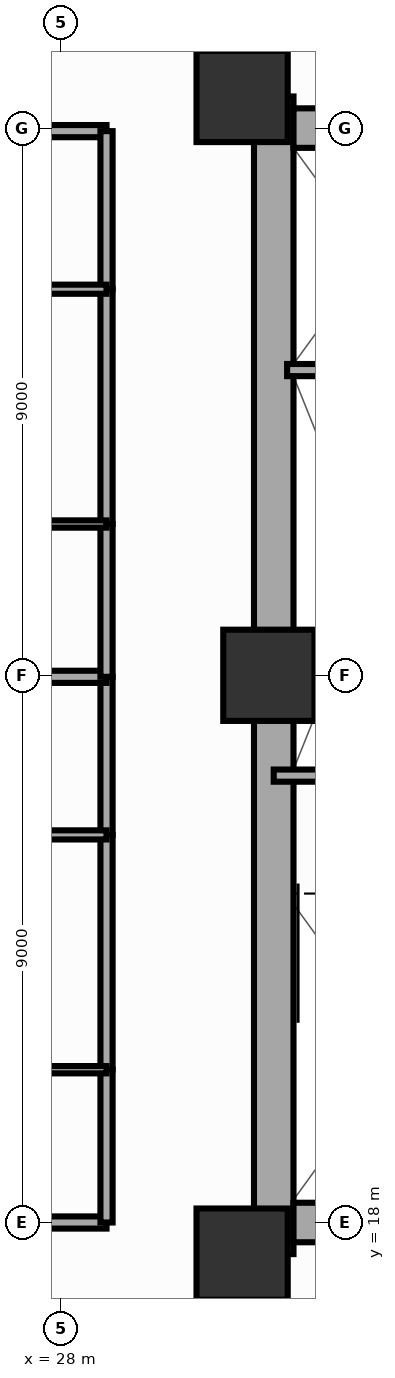
"""IFC4 building model, lengths in metres.
Left out: names, types, materials, properties, quantities, classifications, styles, units other than length and angle.
Written with IfcOpenShell. Run it as: python <this file> out.ifc"""

import sys

from ifc_helpers import new_model, si_unit, direction, frame, frame_2d, origin, origin_2d, place, context, subcontext, project, spatial, rectangle, extrude, source, transform, mapped, element, fill, save


model = new_model("IFC4")
c1 = context("Model", 3, precision=1e-05, world=origin(), true_north=direction((0.0, 1.0)))
c2 = subcontext(c1, "Body", "Model", "MODEL_VIEW")
j1 = project(units=[si_unit("LENGTHUNIT", "METRE"), si_unit("PLANEANGLEUNIT", "RADIAN")], contexts=[c1])
p1 = place(None, origin())
s1 = spatial("IfcSite", under=j1, at=p1, CompositionType="ELEMENT")
p2 = place(p1, origin())
s2 = spatial("IfcBuilding", under=s1, at=p2, CompositionType="ELEMENT")
p3 = place(p2, frame((0.0, 0.0, 19.4)))
s3 = spatial("IfcBuildingStorey", under=s2, at=p3, CompositionType="ELEMENT", Elevation=19.4)
p4 = place(p3, frame((31.5, 17.48, 0.0), z_axis=(0.0, 0.0, 1.0), x_axis=(0.0, 1.0, 0.0)))
e1 = element("IfcWall", 1, at=p4, inside=s3, PredefinedType="SHEAR", context=c2, shape_type="SweptSolid", body=[
    extrude(rectangle(XDim=19.04, YDim=0.65, at=frame_2d((9.52, 0.0))), origin(), (0.0, 0.0, 1.0), 3.0),
])
p5 = place(p4, frame((6.32, 0.0, 0.0)))
e2 = element("IfcOpeningElement", 2, at=p5, cuts=e1, PredefinedType="OPENING", context=c2, shape_type="SweptSolid", body=[
    extrude(rectangle(XDim=1.1, YDim=2.15, at=frame_2d((0.55, 1.075))), frame((0.0, 0.337, 0.0), z_axis=(0.0, -1.0, 0.0), x_axis=(1.0, 0.0, 0.0)), (0.0, 0.0, 1.0), 0.674),
])
p6 = place(p3, frame((31.825, 18.0, 0.0), z_axis=(0.0, 0.0, 1.0), x_axis=(1.0, 0.0, 0.0)))
e3 = element("IfcWall", 3, at=p6, inside=s3, PredefinedType="SHEAR", context=c2, shape_type="SweptSolid", body=[
    extrude(rectangle(XDim=12.35, YDim=0.65, at=frame_2d((6.175, 0.0))), origin(), (0.0, 0.0, 1.0), 3.0),
])
p7 = place(p3, frame((31.825, 36.0, 0.0), z_axis=(0.0, 0.0, 1.0), x_axis=(1.0, 0.0, 0.0)))
e4 = element("IfcWall", 4, at=p7, inside=s3, PredefinedType="SHEAR", context=c2, shape_type="SweptSolid", body=[
    extrude(rectangle(XDim=12.35, YDim=0.65, at=frame_2d((6.175, 0.0))), origin(), (0.0, 0.0, 1.0), 3.0),
])
p8 = place(p7, frame((5.125, 0.0, 0.0), z_axis=(0.0, 0.0, 1.0), x_axis=(-1.0, 0.0, 0.0)))
e5 = element("IfcOpeningElement", 5, at=p8, cuts=e4, PredefinedType="OPENING", context=c2, shape_type="SweptSolid", body=[
    extrude(rectangle(XDim=1.4, YDim=2.15, at=frame_2d((0.7, 1.075))), frame((0.0, 0.337, 0.0), z_axis=(0.0, -1.0, 0.0), x_axis=(1.0, 0.0, 0.0)), (0.0, 0.0, 1.0), 0.674),
])
m1 = source(origin(), c2, "Body", "SweptSolid", [
    extrude(rectangle(XDim=1.5, YDim=1.5, at=origin_2d()), origin(), (0.0, 0.0, 1.0), 3.0),
])
for number, where, z_axis, x_axis in (
    (6, (30.98, 17.48, 0.0), (0.0, 0.0, 1.0), (1.0, 0.0, 0.0)),
    (7, (30.98, 36.52, 0.0), (0.0, 0.0, 1.0), (1.0, 0.0, 0.0)),
    (8, (31.42, 27.0, 0.0), (0.0, 0.0, 1.0), (1.0, 0.0, 0.0)),
):
    element("IfcColumn", number, at=place(p3, frame(where, z_axis=z_axis, x_axis=x_axis)), inside=s3, PredefinedType="COLUMN", context=c2, shape_type="MappedRepresentation", body=[
        mapped(m1, transform((0.0, 0.0, 0.0), scale=1.0)),
    ])
p9 = place(p3, frame((31.5, 25.35, 0.0), z_axis=(0.0, 0.0, 1.0), x_axis=(1.0, 0.0, 0.0)))
e9 = element("IfcWall", 9, at=p9, inside=s3, PredefinedType="SOLIDWALL", context=c2, shape_type="SweptSolid", body=[
    extrude(rectangle(XDim=3.93, YDim=0.2, at=frame_2d((1.965, 0.0))), origin(), (0.0, 0.0, 1.0), 2.79),
])
p10 = place(p3, frame((31.72, 32.02, 0.0), z_axis=(0.0, 0.0, 1.0), x_axis=(1.0, 0.0, 0.0)))
e10 = element("IfcWall", 10, at=p10, inside=s3, PredefinedType="PARTITIONING", context=c2, shape_type="SweptSolid", body=[
    extrude(rectangle(XDim=2.8, YDim=0.2, at=frame_2d((1.4, 0.0))), origin(), (0.0, 0.0, 1.0), 2.79),
])
for number, where, z_axis, x_axis in (
    (11, (28.75, 18.0, 0.0), (0.0, 0.0, 1.0), (-1.0, 0.0, 0.0)),
    (12, (28.75, 35.95, 0.0), (0.0, 0.0, 1.0), (-1.0, 0.0, 0.0)),
):
    element("IfcWall", number, at=place(p3, frame(where, z_axis=z_axis, x_axis=x_axis)), inside=s3, PredefinedType="PARTITIONING", context=c2, shape_type="SweptSolid", body=[
        extrude(rectangle(XDim=16.6, YDim=0.2, at=frame_2d((8.3, 0.0))), origin(), (0.0, 0.0, 1.0), 2.24),
    ])
p11 = place(p3, frame((28.75, 18.0, 0.0), z_axis=(0.0, 0.0, 1.0), x_axis=(0.0, 1.0, 0.0)))
e13 = element("IfcWall", 13, at=p11, inside=s3, PredefinedType="PARTITIONING", context=c2, shape_type="SweptSolid", body=[
    extrude(rectangle(XDim=2.513, YDim=0.2, at=frame_2d((1.256, 0.0))), origin(), (0.0, 0.0, 1.0), 2.79),
])
p12 = place(p3, frame((28.75, 20.513, 0.0), z_axis=(0.0, 0.0, 1.0), x_axis=(0.0, 1.0, 0.0)))
e14 = element("IfcWall", 14, at=p12, inside=s3, PredefinedType="PARTITIONING", context=c2, shape_type="SweptSolid", body=[
    extrude(rectangle(XDim=3.862, YDim=0.2, at=frame_2d((1.931, 0.0))), origin(), (0.0, 0.0, 1.0), 2.79),
])
p13 = place(p12, frame((1.431, 0.0, 0.0)))
e15 = element("IfcOpeningElement", 15, at=p13, cuts=e14, PredefinedType="OPENING", context=c2, shape_type="SweptSolid", body=[
    extrude(rectangle(XDim=1.0, YDim=2.15, at=frame_2d((0.5, 1.075))), frame((0.0, 0.112, 0.0), z_axis=(0.0, -1.0, 0.0), x_axis=(1.0, 0.0, 0.0)), (0.0, 0.0, 1.0), 0.224),
])
p14 = place(p3, frame((28.75, 24.375, 0.0), z_axis=(0.0, 0.0, 1.0), x_axis=(0.0, 1.0, 0.0)))
e16 = element("IfcWall", 16, at=p14, inside=s3, PredefinedType="PARTITIONING", context=c2, shape_type="SweptSolid", body=[
    extrude(rectangle(XDim=2.6, YDim=0.2, at=frame_2d((1.3, 0.0))), origin(), (0.0, 0.0, 1.0), 2.79),
])
p15 = place(p3, frame((28.75, 20.513, 0.0), z_axis=(0.0, 0.0, 1.0), x_axis=(-1.0, 0.0, 0.0)))
e17 = element("IfcWall", 17, at=p15, inside=s3, PredefinedType="PARTITIONING", context=c2, shape_type="SweptSolid", body=[
    extrude(rectangle(XDim=2.12, YDim=0.12, at=frame_2d((1.06, 0.0))), origin(), (0.0, 0.0, 1.0), 2.79),
])
p16 = place(p15, frame((0.635, 0.0, 0.0)))
e18 = element("IfcOpeningElement", 18, at=p16, cuts=e17, PredefinedType="OPENING", context=c2, shape_type="SweptSolid", body=[
    extrude(rectangle(XDim=0.85, YDim=2.05, at=frame_2d((0.425, 1.025))), frame((0.0, 0.072, 0.0), z_axis=(0.0, -1.0, 0.0), x_axis=(1.0, 0.0, 0.0)), (0.0, 0.0, 1.0), 0.144),
])
p17 = place(p3, frame((28.75, 24.375, 0.0), z_axis=(0.0, 0.0, 1.0), x_axis=(-1.0, 0.0, 0.0)))
e19 = element("IfcWall", 19, at=p17, inside=s3, PredefinedType="PARTITIONING", context=c2, shape_type="SweptSolid", body=[
    extrude(rectangle(XDim=2.59, YDim=0.15, at=frame_2d((1.295, 0.0))), origin(), (0.0, 0.0, 1.0), 2.79),
])
p18 = place(p17, frame((0.845, 0.0, 0.0)))
e20 = element("IfcOpeningElement", 20, at=p18, cuts=e19, PredefinedType="OPENING", context=c2, shape_type="SweptSolid", body=[
    extrude(rectangle(XDim=0.9, YDim=2.1, at=frame_2d((0.45, 1.05))), frame((0.0, 0.087, 0.0), z_axis=(0.0, -1.0, 0.0), x_axis=(1.0, 0.0, 0.0)), (0.0, 0.0, 1.0), 0.174),
])
p19 = place(p3, frame((28.75, 26.975, 0.0), z_axis=(0.0, 0.0, 1.0), x_axis=(-1.0, 0.0, 0.0)))
e21 = element("IfcWall", 21, at=p19, inside=s3, PredefinedType="PARTITIONING", context=c2, shape_type="SweptSolid", body=[
    extrude(rectangle(XDim=16.6, YDim=0.2, at=frame_2d((8.3, 0.0))), origin(), (0.0, 0.0, 1.0), 2.79),
])
p20 = place(p3, frame((28.75, 26.975, 0.0), z_axis=(0.0, 0.0, 1.0), x_axis=(0.0, 1.0, 0.0)))
e22 = element("IfcWall", 22, at=p20, inside=s3, PredefinedType="PARTITIONING", context=c2, shape_type="SweptSolid", body=[
    extrude(rectangle(XDim=2.513, YDim=0.2, at=frame_2d((1.256, 0.0))), origin(), (0.0, 0.0, 1.0), 2.79),
])
p21 = place(p3, frame((28.75, 29.488, 0.0), z_axis=(0.0, 0.0, 1.0), x_axis=(0.0, 1.0, 0.0)))
e23 = element("IfcWall", 23, at=p21, inside=s3, PredefinedType="PARTITIONING", context=c2, shape_type="SweptSolid", body=[
    extrude(rectangle(XDim=3.862, YDim=0.2, at=frame_2d((1.931, 0.0))), origin(), (0.0, 0.0, 1.0), 2.79),
])
p22 = place(p21, frame((1.431, 0.0, 0.0)))
e24 = element("IfcOpeningElement", 24, at=p22, cuts=e23, PredefinedType="OPENING", context=c2, shape_type="SweptSolid", body=[
    extrude(rectangle(XDim=1.0, YDim=2.15, at=frame_2d((0.5, 1.075))), frame((0.0, 0.112, 0.0), z_axis=(0.0, -1.0, 0.0), x_axis=(1.0, 0.0, 0.0)), (0.0, 0.0, 1.0), 0.224),
])
p23 = place(p3, frame((28.75, 33.35, 0.0), z_axis=(0.0, 0.0, 1.0), x_axis=(0.0, 1.0, 0.0)))
e25 = element("IfcWall", 25, at=p23, inside=s3, PredefinedType="PARTITIONING", context=c2, shape_type="SweptSolid", body=[
    extrude(rectangle(XDim=2.6, YDim=0.2, at=frame_2d((1.3, 0.0))), origin(), (0.0, 0.0, 1.0), 2.79),
])
p24 = place(p3, frame((28.75, 29.488, 0.0), z_axis=(0.0, 0.0, 1.0), x_axis=(-1.0, 0.0, 0.0)))
e26 = element("IfcWall", 26, at=p24, inside=s3, PredefinedType="PARTITIONING", context=c2, shape_type="SweptSolid", body=[
    extrude(rectangle(XDim=2.12, YDim=0.12, at=frame_2d((1.06, 0.0))), origin(), (0.0, 0.0, 1.0), 2.79),
])
p25 = place(p24, frame((0.635, 0.0, 0.0)))
e27 = element("IfcOpeningElement", 27, at=p25, cuts=e26, PredefinedType="OPENING", context=c2, shape_type="SweptSolid", body=[
    extrude(rectangle(XDim=0.85, YDim=2.05, at=frame_2d((0.425, 1.025))), frame((0.0, 0.072, 0.0), z_axis=(0.0, -1.0, 0.0), x_axis=(1.0, 0.0, 0.0)), (0.0, 0.0, 1.0), 0.144),
])
p26 = place(p3, frame((28.75, 33.35, 0.0), z_axis=(0.0, 0.0, 1.0), x_axis=(-1.0, 0.0, 0.0)))
e28 = element("IfcWall", 28, at=p26, inside=s3, PredefinedType="PARTITIONING", context=c2, shape_type="SweptSolid", body=[
    extrude(rectangle(XDim=2.59, YDim=0.15, at=frame_2d((1.295, 0.0))), origin(), (0.0, 0.0, 1.0), 2.79),
])
p27 = place(p26, frame((0.845, 0.0, 0.0)))
e29 = element("IfcOpeningElement", 29, at=p27, cuts=e28, PredefinedType="OPENING", context=c2, shape_type="SweptSolid", body=[
    extrude(rectangle(XDim=0.9, YDim=2.1, at=frame_2d((0.45, 1.05))), frame((0.0, 0.087, 0.0), z_axis=(0.0, -1.0, 0.0), x_axis=(1.0, 0.0, 0.0)), (0.0, 0.0, 1.0), 0.174),
])
m2 = source(origin(), c2, "Body", "SweptSolid", [
    extrude(rectangle(XDim=1.1, YDim=2.15, at=frame_2d((0.55, 1.075))), frame((0.0, 0.025, 0.0), z_axis=(0.0, -1.0, 0.0), x_axis=(1.0, 0.0, 0.0)), (0.0, 0.0, 1.0), 0.05),
])
p28 = place(p5, origin())
e30 = element("IfcDoor", 30, at=p28, inside=s3, OperationType="SINGLE_SWING_LEFT", PredefinedType="DOOR", context=c2, shape_type="MappedRepresentation", body=[
    mapped(m2, transform((0.0, 0.0, 0.0), scale=1.0)),
])
fill(e2, e30)
m3 = source(origin(), c2, "Body", "SweptSolid", [
    extrude(rectangle(XDim=1.0, YDim=2.15, at=frame_2d((0.5, 1.075))), frame((0.0, 0.025, 0.0), z_axis=(0.0, -1.0, 0.0), x_axis=(1.0, 0.0, 0.0)), (0.0, 0.0, 1.0), 0.05),
])
p29 = place(p13, origin())
e31 = element("IfcDoor", 31, at=p29, inside=s3, OperationType="SINGLE_SWING_RIGHT", PredefinedType="DOOR", context=c2, shape_type="MappedRepresentation", body=[
    mapped(m3, transform((0.0, 0.0, 0.0), scale=1.0)),
])
fill(e15, e31)
m4 = source(origin(), c2, "Body", "SweptSolid", [
    extrude(rectangle(XDim=0.85, YDim=2.05, at=frame_2d((0.425, 1.025))), frame((0.0, 0.025, 0.0), z_axis=(0.0, -1.0, 0.0), x_axis=(1.0, 0.0, 0.0)), (0.0, 0.0, 1.0), 0.05),
])
p30 = place(p16, origin())
e32 = element("IfcDoor", 32, at=p30, inside=s3, OperationType="SINGLE_SWING_LEFT", PredefinedType="DOOR", context=c2, shape_type="MappedRepresentation", body=[
    mapped(m4, transform((0.0, 0.0, 0.0), scale=1.0)),
])
fill(e18, e32)
m5 = source(origin(), c2, "Body", "SweptSolid", [
    extrude(rectangle(XDim=0.9, YDim=2.1, at=frame_2d((0.45, 1.05))), frame((0.0, 0.025, 0.0), z_axis=(0.0, -1.0, 0.0), x_axis=(1.0, 0.0, 0.0)), (0.0, 0.0, 1.0), 0.05),
])
p31 = place(p18, origin())
e33 = element("IfcDoor", 33, at=p31, inside=s3, OperationType="SINGLE_SWING_LEFT", PredefinedType="DOOR", context=c2, shape_type="MappedRepresentation", body=[
    mapped(m5, transform((0.0, 0.0, 0.0), scale=1.0)),
])
fill(e20, e33)
p32 = place(p22, origin())
e34 = element("IfcDoor", 34, at=p32, inside=s3, OperationType="SINGLE_SWING_LEFT", PredefinedType="DOOR", context=c2, shape_type="MappedRepresentation", body=[
    mapped(m3, transform((0.0, 0.0, 0.0), scale=1.0)),
])
fill(e24, e34)
p33 = place(p25, origin())
e35 = element("IfcDoor", 35, at=p33, inside=s3, OperationType="SINGLE_SWING_RIGHT", PredefinedType="DOOR", context=c2, shape_type="MappedRepresentation", body=[
    mapped(m4, transform((0.0, 0.0, 0.0), scale=1.0)),
])
fill(e27, e35)
p34 = place(p27, origin())
e36 = element("IfcDoor", 36, at=p34, inside=s3, OperationType="SINGLE_SWING_RIGHT", PredefinedType="DOOR", context=c2, shape_type="MappedRepresentation", body=[
    mapped(m5, transform((0.0, 0.0, 0.0), scale=1.0)),
])
fill(e29, e36)
save(model, sys.argv[1])
